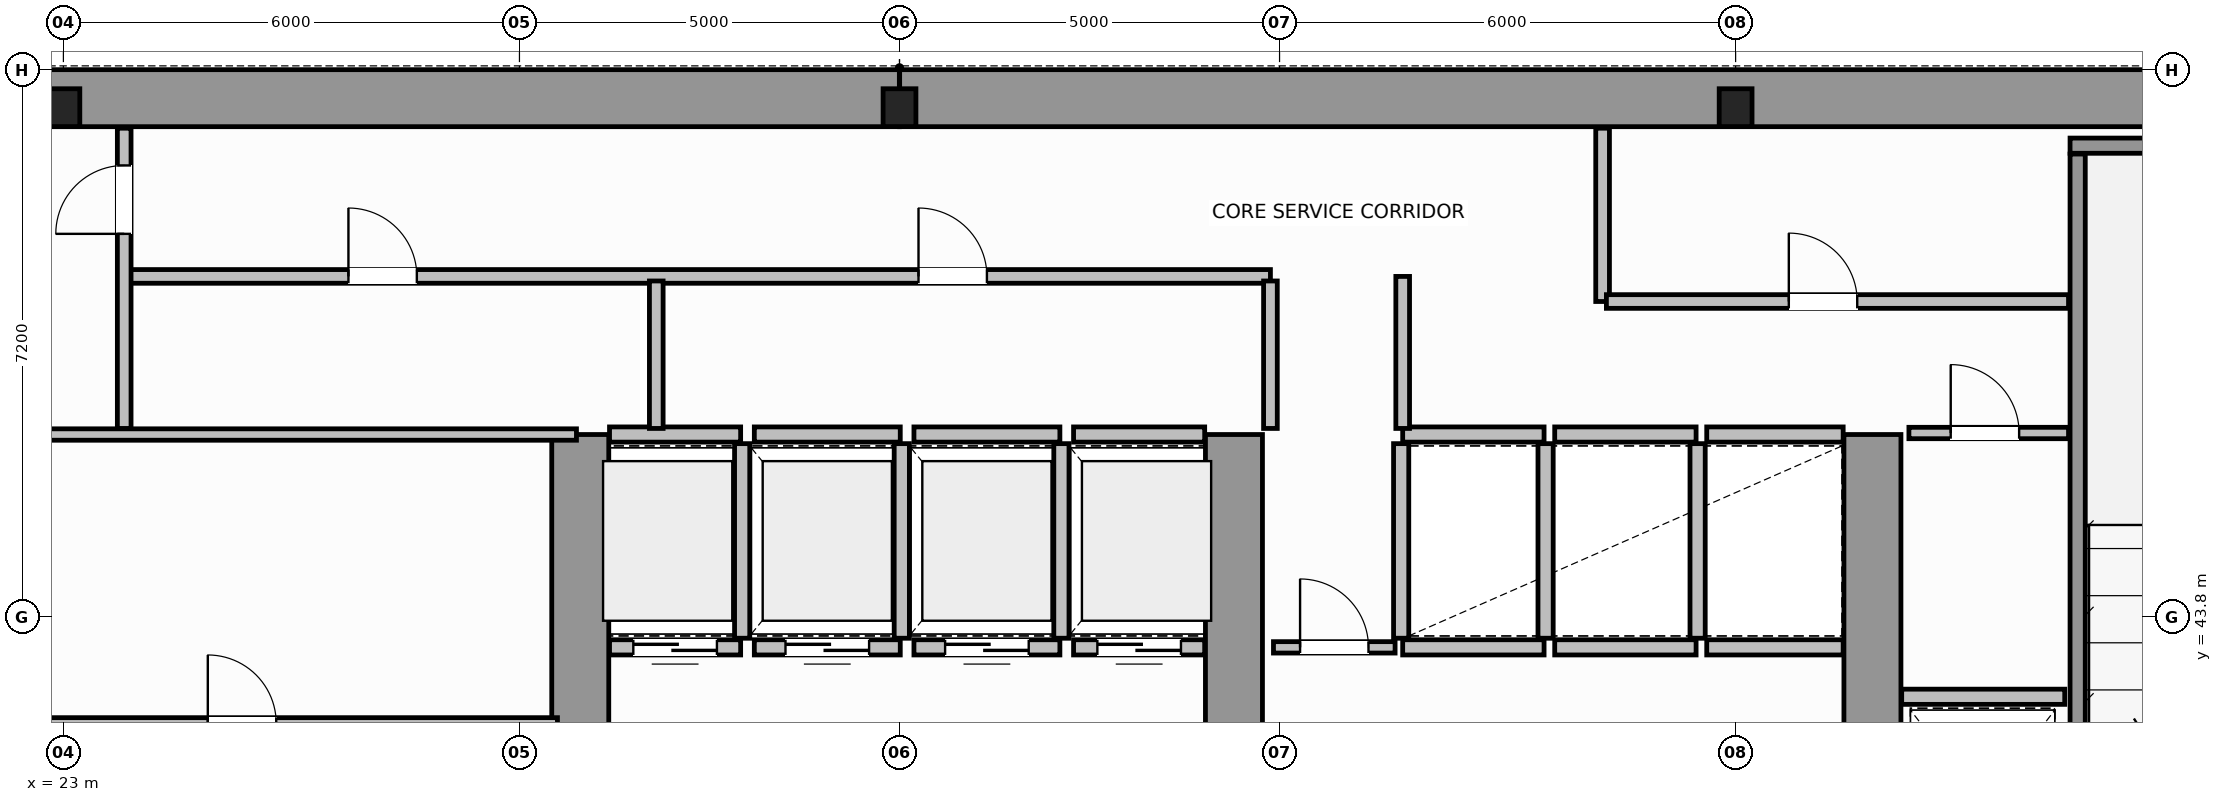
"""IFC4 building model, lengths in metres.
Left out: names, types, materials, properties, quantities, classifications, styles, units other than length and angle.
Written with IfcOpenShell. Run it as: python <this file> out.ifc"""

import sys

from ifc_helpers import new_model, si_unit, direction, frame, frame_2d, origin, origin_2d, place, context, subcontext, project, spatial, rectangle, i_section, extrude, source, transform, mapped, element, fill, save


model = new_model("IFC4")
c1 = context("Model", 3, precision=1e-05, world=origin(), true_north=direction((0.0, 1.0)))
c2 = subcontext(c1, "Body", "Model", "MODEL_VIEW")
j1 = project(units=[si_unit("LENGTHUNIT", "METRE"), si_unit("PLANEANGLEUNIT", "RADIAN")], contexts=[c1])
p1 = place(None, origin())
s1 = spatial("IfcSite", under=j1, at=p1, CompositionType="ELEMENT")
p2 = place(p1, origin())
s2 = spatial("IfcBuilding", under=s1, at=p2, CompositionType="ELEMENT")
p3 = place(p2, frame((0.0, 0.0, 153.8)))
s3 = spatial("IfcBuildingStorey", under=s2, at=p3, CompositionType="ELEMENT", Elevation=153.8)
m1 = source(origin(), c2, "Body", "SweptSolid", [
    extrude(i_section(OverallWidth=0.432, OverallDepth=0.498, WebThickness=0.055, FlangeThickness=0.068, FilletRadius=0.015, at=origin_2d()), origin(), (0.0, 0.0, 1.0), 3.8),
])
for number, where, z_axis, x_axis in (
    (1, (23.0, 50.5, 0.0), (0.0, 0.0, 1.0), (1.0, 0.0, 0.0)),
    (2, (34.0, 50.5, 0.0), (0.0, 0.0, 1.0), (1.0, 0.0, 0.0)),
    (3, (45.0, 50.5, 0.0), (0.0, 0.0, 1.0), (1.0, 0.0, 0.0)),
):
    element("IfcColumn", number, at=place(p3, frame(where, z_axis=z_axis, x_axis=x_axis)), inside=s3, PredefinedType="COLUMN", context=c2, shape_type="MappedRepresentation", body=[
        mapped(m1, transform((0.0, 0.0, 0.0), scale=1.0)),
    ])
for number, where, z_axis, x_axis in (
    (4, (14.379, 50.625, 0.0), (0.0, 0.0, 1.0), (1.0, 0.0, 0.0)),
    (5, (34.002, 50.625, 0.0), (0.0, 0.0, 1.0), (1.0, 0.0, 0.0)),
):
    element("IfcWall", number, at=place(p3, frame(where, z_axis=z_axis, x_axis=x_axis)), inside=s3, PredefinedType="SHEAR", context=c2, shape_type="SweptSolid", body=[
        extrude(rectangle(XDim=19.619, YDim=0.75, at=frame_2d((9.81, 0.0))), origin(), (0.0, 0.0, 1.0), 3.8),
    ])
for number, where, z_axis, x_axis in (
    (6, (29.8, 36.895, 0.0), (0.0, 0.0, 1.0), (0.0, 1.0, 0.0)),
    (7, (38.4, 36.895, 0.0), (0.0, 0.0, 1.0), (0.0, 1.0, 0.0)),
    (8, (46.8, 36.895, 0.0), (0.0, 0.0, 1.0), (0.0, 1.0, 0.0)),
):
    element("IfcWall", number, at=place(p3, frame(where, z_axis=z_axis, x_axis=x_axis)), inside=s3, PredefinedType="SHEAR", context=c2, shape_type="SweptSolid", body=[
        extrude(rectangle(XDim=9.305, YDim=0.75, at=frame_2d((4.652, 0.0))), origin(), (0.0, 0.0, 1.0), 3.8),
    ])
p4 = place(p3, frame((49.4, 50.0, 0.0), z_axis=(0.0, 0.0, 1.0), x_axis=(1.0, 0.0, 0.0)))
e9 = element("IfcWall", 9, at=p4, inside=s3, PredefinedType="SOLIDWALL", context=c2, shape_type="SweptSolid", body=[
    extrude(rectangle(XDim=4.225, YDim=0.2, at=frame_2d((2.113, 0.0))), origin(), (0.0, 0.0, 1.0), 3.8),
])
p5 = place(p3, frame((49.5, 39.96, 0.0), z_axis=(0.0, 0.0, 1.0), x_axis=(0.0, 1.0, 0.0)))
e10 = element("IfcWall", 10, at=p5, inside=s3, PredefinedType="SOLIDWALL", context=c2, shape_type="SweptSolid", body=[
    extrude(rectangle(XDim=9.93, YDim=0.2, at=frame_2d((4.965, 0.0))), origin(), (0.0, 0.0, 1.0), 3.8),
])
p6 = place(p3, frame((30.185, 43.4, 0.0), z_axis=(0.0, 0.0, 1.0), x_axis=(1.0, 0.0, 0.0)))
e11 = element("IfcWall", 11, at=p6, inside=s3, PredefinedType="SOLIDWALL", context=c2, shape_type="SweptSolid", body=[
    extrude(rectangle(XDim=1.725, YDim=0.2, at=frame_2d((0.862, 0.0))), origin(), (0.0, 0.0, 1.0), 3.58),
])
p7 = place(p6, frame((0.313, 0.0, 0.0)))
e12 = element("IfcOpeningElement", 12, at=p7, cuts=e11, PredefinedType="OPENING", context=c2, shape_type="SweptSolid", body=[
    extrude(rectangle(XDim=1.1, YDim=2.15, at=frame_2d((0.55, 1.075))), frame((0.0, 0.11, 0.0), z_axis=(0.0, -1.0, 0.0), x_axis=(1.0, 0.0, 0.0)), (0.0, 0.0, 1.0), 0.22),
])
p8 = place(p3, frame((30.185, 46.2, 0.0), z_axis=(0.0, 0.0, 1.0), x_axis=(1.0, 0.0, 0.0)))
e13 = element("IfcWall", 13, at=p8, inside=s3, PredefinedType="SOLIDWALL", context=c2, shape_type="SweptSolid", body=[
    extrude(rectangle(XDim=1.725, YDim=0.2, at=frame_2d((0.862, 0.0))), origin(), (0.0, 0.0, 1.0), 3.58),
])
p9 = place(p3, frame((31.93, 43.52, 0.0), z_axis=(0.0, 0.0, 1.0), x_axis=(0.0, 1.0, 0.0)))
e14 = element("IfcWall", 14, at=p9, inside=s3, PredefinedType="SOLIDWALL", context=c2, shape_type="SweptSolid", body=[
    extrude(rectangle(XDim=2.56, YDim=0.2, at=frame_2d((1.28, 0.0))), origin(), (0.0, 0.0, 1.0), 3.58),
])
p10 = place(p3, frame((32.09, 43.4, 0.0), z_axis=(0.0, 0.0, 1.0), x_axis=(1.0, 0.0, 0.0)))
e15 = element("IfcWall", 15, at=p10, inside=s3, PredefinedType="SOLIDWALL", context=c2, shape_type="SweptSolid", body=[
    extrude(rectangle(XDim=1.92, YDim=0.2, at=frame_2d((0.96, 0.0))), origin(), (0.0, 0.0, 1.0), 3.58),
])
p11 = place(p10, frame((0.41, 0.0, 0.0)))
e16 = element("IfcOpeningElement", 16, at=p11, cuts=e15, PredefinedType="OPENING", context=c2, shape_type="SweptSolid", body=[
    extrude(rectangle(XDim=1.1, YDim=2.15, at=frame_2d((0.55, 1.075))), frame((0.0, 0.11, 0.0), z_axis=(0.0, -1.0, 0.0), x_axis=(1.0, 0.0, 0.0)), (0.0, 0.0, 1.0), 0.22),
])
p12 = place(p3, frame((32.09, 46.2, 0.0), z_axis=(0.0, 0.0, 1.0), x_axis=(1.0, 0.0, 0.0)))
e17 = element("IfcWall", 17, at=p12, inside=s3, PredefinedType="SOLIDWALL", context=c2, shape_type="SweptSolid", body=[
    extrude(rectangle(XDim=1.92, YDim=0.2, at=frame_2d((0.96, 0.0))), origin(), (0.0, 0.0, 1.0), 3.58),
])
p13 = place(p3, frame((34.03, 43.52, 0.0), z_axis=(0.0, 0.0, 1.0), x_axis=(0.0, 1.0, 0.0)))
e18 = element("IfcWall", 18, at=p13, inside=s3, PredefinedType="SOLIDWALL", context=c2, shape_type="SweptSolid", body=[
    extrude(rectangle(XDim=2.56, YDim=0.2, at=frame_2d((1.28, 0.0))), origin(), (0.0, 0.0, 1.0), 3.58),
])
p14 = place(p3, frame((34.19, 43.4, 0.0), z_axis=(0.0, 0.0, 1.0), x_axis=(1.0, 0.0, 0.0)))
e19 = element("IfcWall", 19, at=p14, inside=s3, PredefinedType="SOLIDWALL", context=c2, shape_type="SweptSolid", body=[
    extrude(rectangle(XDim=1.92, YDim=0.2, at=frame_2d((0.96, 0.0))), origin(), (0.0, 0.0, 1.0), 3.58),
])
p15 = place(p14, frame((0.41, 0.0, 0.0)))
e20 = element("IfcOpeningElement", 20, at=p15, cuts=e19, PredefinedType="OPENING", context=c2, shape_type="SweptSolid", body=[
    extrude(rectangle(XDim=1.1, YDim=2.15, at=frame_2d((0.55, 1.075))), frame((0.0, 0.11, 0.0), z_axis=(0.0, -1.0, 0.0), x_axis=(1.0, 0.0, 0.0)), (0.0, 0.0, 1.0), 0.22),
])
p16 = place(p3, frame((34.19, 46.2, 0.0), z_axis=(0.0, 0.0, 1.0), x_axis=(1.0, 0.0, 0.0)))
e21 = element("IfcWall", 21, at=p16, inside=s3, PredefinedType="SOLIDWALL", context=c2, shape_type="SweptSolid", body=[
    extrude(rectangle(XDim=1.92, YDim=0.2, at=frame_2d((0.96, 0.0))), origin(), (0.0, 0.0, 1.0), 3.58),
])
p17 = place(p3, frame((36.13, 43.52, 0.0), z_axis=(0.0, 0.0, 1.0), x_axis=(0.0, 1.0, 0.0)))
e22 = element("IfcWall", 22, at=p17, inside=s3, PredefinedType="SOLIDWALL", context=c2, shape_type="SweptSolid", body=[
    extrude(rectangle(XDim=2.56, YDim=0.2, at=frame_2d((1.28, 0.0))), origin(), (0.0, 0.0, 1.0), 3.58),
])
p18 = place(p3, frame((36.29, 43.4, 0.0), z_axis=(0.0, 0.0, 1.0), x_axis=(1.0, 0.0, 0.0)))
e23 = element("IfcWall", 23, at=p18, inside=s3, PredefinedType="SOLIDWALL", context=c2, shape_type="SweptSolid", body=[
    extrude(rectangle(XDim=1.725, YDim=0.2, at=frame_2d((0.862, 0.0))), origin(), (0.0, 0.0, 1.0), 3.58),
])
p19 = place(p18, frame((0.313, 0.0, 0.0)))
e24 = element("IfcOpeningElement", 24, at=p19, cuts=e23, PredefinedType="OPENING", context=c2, shape_type="SweptSolid", body=[
    extrude(rectangle(XDim=1.1, YDim=2.15, at=frame_2d((0.55, 1.075))), frame((0.0, 0.11, 0.0), z_axis=(0.0, -1.0, 0.0), x_axis=(1.0, 0.0, 0.0)), (0.0, 0.0, 1.0), 0.22),
])
p20 = place(p3, frame((36.29, 46.2, 0.0), z_axis=(0.0, 0.0, 1.0), x_axis=(1.0, 0.0, 0.0)))
e25 = element("IfcWall", 25, at=p20, inside=s3, PredefinedType="SOLIDWALL", context=c2, shape_type="SweptSolid", body=[
    extrude(rectangle(XDim=1.725, YDim=0.2, at=frame_2d((0.862, 0.0))), origin(), (0.0, 0.0, 1.0), 3.58),
])
for number, where, z_axis, x_axis in (
    (26, (40.62, 43.4, 0.0), (0.0, 0.0, 1.0), (1.0, 0.0, 0.0)),
    (27, (40.62, 46.2, 0.0), (0.0, 0.0, 1.0), (1.0, 0.0, 0.0)),
):
    element("IfcWall", number, at=place(p3, frame(where, z_axis=z_axis, x_axis=x_axis)), inside=s3, PredefinedType="SOLIDWALL", context=c2, shape_type="SweptSolid", body=[
        extrude(rectangle(XDim=1.86, YDim=0.2, at=frame_2d((0.93, 0.0))), origin(), (0.0, 0.0, 1.0), 3.58),
    ])
for number, where, z_axis, x_axis in (
    (28, (40.6, 43.52, 0.0), (0.0, 0.0, 1.0), (0.0, 1.0, 0.0)),
    (29, (42.5, 43.52, 0.0), (0.0, 0.0, 1.0), (0.0, 1.0, 0.0)),
):
    element("IfcWall", number, at=place(p3, frame(where, z_axis=z_axis, x_axis=x_axis)), inside=s3, PredefinedType="SOLIDWALL", context=c2, shape_type="SweptSolid", body=[
        extrude(rectangle(XDim=2.56, YDim=0.2, at=frame_2d((1.28, 0.0))), origin(), (0.0, 0.0, 1.0), 3.58),
    ])
for number, where, z_axis, x_axis in (
    (30, (42.62, 43.4, 0.0), (0.0, 0.0, 1.0), (1.0, 0.0, 0.0)),
    (31, (42.62, 46.2, 0.0), (0.0, 0.0, 1.0), (1.0, 0.0, 0.0)),
):
    element("IfcWall", number, at=place(p3, frame(where, z_axis=z_axis, x_axis=x_axis)), inside=s3, PredefinedType="SOLIDWALL", context=c2, shape_type="SweptSolid", body=[
        extrude(rectangle(XDim=1.86, YDim=0.2, at=frame_2d((0.93, 0.0))), origin(), (0.0, 0.0, 1.0), 3.58),
    ])
p21 = place(p3, frame((44.5, 43.52, 0.0), z_axis=(0.0, 0.0, 1.0), x_axis=(0.0, 1.0, 0.0)))
e32 = element("IfcWall", 32, at=p21, inside=s3, PredefinedType="SOLIDWALL", context=c2, shape_type="SweptSolid", body=[
    extrude(rectangle(XDim=2.56, YDim=0.2, at=frame_2d((1.28, 0.0))), origin(), (0.0, 0.0, 1.0), 3.58),
])
for number, where, z_axis, x_axis in (
    (33, (44.62, 43.4, 0.0), (0.0, 0.0, 1.0), (1.0, 0.0, 0.0)),
    (34, (44.62, 46.2, 0.0), (0.0, 0.0, 1.0), (1.0, 0.0, 0.0)),
):
    element("IfcWall", number, at=place(p3, frame(where, z_axis=z_axis, x_axis=x_axis)), inside=s3, PredefinedType="SOLIDWALL", context=c2, shape_type="SweptSolid", body=[
        extrude(rectangle(XDim=1.795, YDim=0.2, at=frame_2d((0.897, 0.0))), origin(), (0.0, 0.0, 1.0), 3.58),
    ])
p22 = place(p3, frame((47.185, 42.75, 0.0), z_axis=(0.0, 0.0, 1.0), x_axis=(1.0, 0.0, 0.0)))
e35 = element("IfcWall", 35, at=p22, inside=s3, PredefinedType="SOLIDWALL", context=c2, shape_type="SweptSolid", body=[
    extrude(rectangle(XDim=2.145, YDim=0.2, at=frame_2d((1.073, 0.0))), origin(), (0.0, 0.0, 1.0), 3.58),
])
p23 = place(p3, frame((21.25, 46.2, 0.0), z_axis=(0.0, 0.0, 1.0), x_axis=(1.0, 0.0, 0.0)))
e36 = element("IfcWall", 36, at=p23, inside=s3, PredefinedType="PARTITIONING", context=c2, shape_type="SweptSolid", body=[
    extrude(rectangle(XDim=8.5, YDim=0.15, at=frame_2d((4.25, 0.0))), origin(), (0.0, 0.0, 1.0), 3.58),
])
p24 = place(p3, frame((21.5, 42.4, 0.0), z_axis=(0.0, 0.0, 1.0), x_axis=(1.0, 0.0, 0.0)))
e37 = element("IfcWall", 37, at=p24, inside=s3, PredefinedType="PARTITIONING", context=c2, shape_type="SweptSolid", body=[
    extrude(rectangle(XDim=8.0, YDim=0.15, at=frame_2d((4.0, 0.0))), origin(), (0.0, 0.0, 1.0), 3.58),
])
p25 = place(p24, frame((3.4, 0.0, 0.0)))
e38 = element("IfcOpeningElement", 38, at=p25, cuts=e37, PredefinedType="OPENING", context=c2, shape_type="SweptSolid", body=[
    extrude(rectangle(XDim=0.9, YDim=2.1, at=frame_2d((0.45, 1.05))), frame((0.0, 0.085, 0.0), z_axis=(0.0, -1.0, 0.0), x_axis=(1.0, 0.0, 0.0)), (0.0, 0.0, 1.0), 0.17),
])
p26 = place(p3, frame((47.28, 46.22, 0.0), z_axis=(0.0, 0.0, 1.0), x_axis=(1.0, 0.0, 0.0)))
e39 = element("IfcWall", 39, at=p26, inside=s3, PredefinedType="PARTITIONING", context=c2, shape_type="SweptSolid", body=[
    extrude(rectangle(XDim=2.1, YDim=0.15, at=frame_2d((1.05, 0.0))), origin(), (0.0, 0.0, 1.0), 3.58),
])
p27 = place(p26, frame((0.55, 0.0, 0.0)))
e40 = element("IfcOpeningElement", 40, at=p27, cuts=e39, PredefinedType="OPENING", context=c2, shape_type="SweptSolid", body=[
    extrude(rectangle(XDim=0.9, YDim=2.1, at=frame_2d((0.45, 1.05))), frame((0.0, 0.085, 0.0), z_axis=(0.0, -1.0, 0.0), x_axis=(1.0, 0.0, 0.0)), (0.0, 0.0, 1.0), 0.17),
])
p28 = place(p3, frame((38.92, 43.4, 0.0), z_axis=(0.0, 0.0, 1.0), x_axis=(1.0, 0.0, 0.0)))
e41 = element("IfcWall", 41, at=p28, inside=s3, PredefinedType="PARTITIONING", context=c2, shape_type="SweptSolid", body=[
    extrude(rectangle(XDim=1.6, YDim=0.15, at=frame_2d((0.8, 0.0))), origin(), (0.0, 0.0, 1.0), 3.58),
])
p29 = place(p28, frame((0.35, 0.0, 0.0)))
e42 = element("IfcOpeningElement", 42, at=p29, cuts=e41, PredefinedType="OPENING", context=c2, shape_type="SweptSolid", body=[
    extrude(rectangle(XDim=0.9, YDim=2.1, at=frame_2d((0.45, 1.05))), frame((0.0, 0.085, 0.0), z_axis=(0.0, -1.0, 0.0), x_axis=(1.0, 0.0, 0.0)), (0.0, 0.0, 1.0), 0.17),
])
p30 = place(p3, frame((23.85, 48.28, 0.0), z_axis=(0.0, 0.0, 1.0), x_axis=(1.0, 0.0, 0.0)))
e43 = element("IfcWall", 43, at=p30, inside=s3, PredefinedType="PLUMBINGWALL", context=c2, shape_type="SweptSolid", body=[
    extrude(rectangle(XDim=15.03, YDim=0.18, at=frame_2d((7.515, 0.0))), origin(), (0.0, 0.0, 1.0), 3.58),
])
p31 = place(p30, frame((2.9, 0.0, 0.0)))
e44 = element("IfcOpeningElement", 44, at=p31, cuts=e43, PredefinedType="OPENING", context=c2, shape_type="SweptSolid", body=[
    extrude(rectangle(XDim=0.9, YDim=2.15, at=frame_2d((0.45, 1.075))), frame((0.0, 0.1, 0.0), z_axis=(0.0, -1.0, 0.0), x_axis=(1.0, 0.0, 0.0)), (0.0, 0.0, 1.0), 0.2),
])
p32 = place(p30, frame((10.4, 0.0, 0.0)))
e45 = element("IfcOpeningElement", 45, at=p32, cuts=e43, PredefinedType="OPENING", context=c2, shape_type="SweptSolid", body=[
    extrude(rectangle(XDim=0.9, YDim=2.15, at=frame_2d((0.45, 1.075))), frame((0.0, 0.1, 0.0), z_axis=(0.0, -1.0, 0.0), x_axis=(1.0, 0.0, 0.0)), (0.0, 0.0, 1.0), 0.2),
])
p33 = place(p3, frame((23.8, 46.28, 0.0), z_axis=(0.0, 0.0, 1.0), x_axis=(0.0, 1.0, 0.0)))
e46 = element("IfcWall", 46, at=p33, inside=s3, PredefinedType="PLUMBINGWALL", context=c2, shape_type="SweptSolid", body=[
    extrude(rectangle(XDim=3.95, YDim=0.18, at=frame_2d((1.975, 0.0))), origin(), (0.0, 0.0, 1.0), 3.58),
])
p34 = place(p33, frame((2.56, 0.0, 0.0)))
e47 = element("IfcOpeningElement", 47, at=p34, cuts=e46, PredefinedType="OPENING", context=c2, shape_type="SweptSolid", body=[
    extrude(rectangle(XDim=0.9, YDim=2.15, at=frame_2d((0.45, 1.075))), frame((0.0, 0.1, 0.0), z_axis=(0.0, -1.0, 0.0), x_axis=(1.0, 0.0, 0.0)), (0.0, 0.0, 1.0), 0.2),
])
for number, where, z_axis, x_axis in (
    (48, (30.8, 46.28, 0.0), (0.0, 0.0, 1.0), (0.0, 1.0, 0.0)),
    (49, (38.88, 46.28, 0.0), (0.0, 0.0, 1.0), (0.0, 1.0, 0.0)),
):
    element("IfcWall", number, at=place(p3, frame(where, z_axis=z_axis, x_axis=x_axis)), inside=s3, PredefinedType="PLUMBINGWALL", context=c2, shape_type="SweptSolid", body=[
        extrude(rectangle(XDim=1.94, YDim=0.18, at=frame_2d((0.97, 0.0))), origin(), (0.0, 0.0, 1.0), 3.58),
    ])
p35 = place(p3, frame((40.62, 46.28, 0.0), z_axis=(0.0, 0.0, 1.0), x_axis=(0.0, 1.0, 0.0)))
e50 = element("IfcWall", 50, at=p35, inside=s3, PredefinedType="PLUMBINGWALL", context=c2, shape_type="SweptSolid", body=[
    extrude(rectangle(XDim=2.0, YDim=0.18, at=frame_2d((1.0, 0.0))), origin(), (0.0, 0.0, 1.0), 3.58),
])
p36 = place(p3, frame((43.25, 47.95, 0.0), z_axis=(0.0, 0.0, 1.0), x_axis=(0.0, 1.0, 0.0)))
e51 = element("IfcWall", 51, at=p36, inside=s3, PredefinedType="PLUMBINGWALL", context=c2, shape_type="SweptSolid", body=[
    extrude(rectangle(XDim=2.28, YDim=0.18, at=frame_2d((1.14, 0.0))), origin(), (0.0, 0.0, 1.0), 3.58),
])
p37 = place(p3, frame((43.3, 47.95, 0.0), z_axis=(0.0, 0.0, 1.0), x_axis=(1.0, 0.0, 0.0)))
e52 = element("IfcWall", 52, at=p37, inside=s3, PredefinedType="PLUMBINGWALL", context=c2, shape_type="SweptSolid", body=[
    extrude(rectangle(XDim=6.08, YDim=0.18, at=frame_2d((3.04, 0.0))), origin(), (0.0, 0.0, 1.0), 3.58),
])
p38 = place(p37, frame((2.4, 0.0, 0.0)))
e53 = element("IfcOpeningElement", 53, at=p38, cuts=e52, PredefinedType="OPENING", context=c2, shape_type="SweptSolid", body=[
    extrude(rectangle(XDim=0.9, YDim=2.15, at=frame_2d((0.45, 1.075))), frame((0.0, 0.1, 0.0), z_axis=(0.0, -1.0, 0.0), x_axis=(1.0, 0.0, 0.0)), (0.0, 0.0, 1.0), 0.2),
])
m2 = source(origin(), c2, "Body", "SweptSolid", [
    extrude(rectangle(XDim=1.1, YDim=2.15, at=frame_2d((0.55, 1.075))), frame((0.0, 0.025, 0.0), z_axis=(0.0, -1.0, 0.0), x_axis=(1.0, 0.0, 0.0)), (0.0, 0.0, 1.0), 0.05),
])
p39 = place(p7, origin())
e54 = element("IfcDoor", 54, at=p39, inside=s3, OperationType="DOUBLE_DOOR_SLIDING", PredefinedType="DOOR", context=c2, shape_type="MappedRepresentation", body=[
    mapped(m2, transform((0.0, 0.0, 0.0), scale=1.0)),
])
fill(e12, e54)
p40 = place(p11, origin())
e55 = element("IfcDoor", 55, at=p40, inside=s3, OperationType="DOUBLE_DOOR_SLIDING", PredefinedType="DOOR", context=c2, shape_type="MappedRepresentation", body=[
    mapped(m2, transform((0.0, 0.0, 0.0), scale=1.0)),
])
fill(e16, e55)
p41 = place(p15, origin())
e56 = element("IfcDoor", 56, at=p41, inside=s3, OperationType="DOUBLE_DOOR_SLIDING", PredefinedType="DOOR", context=c2, shape_type="MappedRepresentation", body=[
    mapped(m2, transform((0.0, 0.0, 0.0), scale=1.0)),
])
fill(e20, e56)
p42 = place(p19, origin())
e57 = element("IfcDoor", 57, at=p42, inside=s3, OperationType="DOUBLE_DOOR_SLIDING", PredefinedType="DOOR", context=c2, shape_type="MappedRepresentation", body=[
    mapped(m2, transform((0.0, 0.0, 0.0), scale=1.0)),
])
fill(e24, e57)
m3 = source(origin(), c2, "Body", "SweptSolid", [
    extrude(rectangle(XDim=0.9, YDim=2.1, at=frame_2d((0.45, 1.05))), frame((0.0, 0.025, 0.0), z_axis=(0.0, -1.0, 0.0), x_axis=(1.0, 0.0, 0.0)), (0.0, 0.0, 1.0), 0.05),
])
p43 = place(p25, origin())
e58 = element("IfcDoor", 58, at=p43, inside=s3, OperationType="SINGLE_SWING_RIGHT", PredefinedType="DOOR", context=c2, shape_type="MappedRepresentation", body=[
    mapped(m3, transform((0.0, 0.0, 0.0), scale=1.0)),
])
fill(e38, e58)
p44 = place(p27, origin())
e59 = element("IfcDoor", 59, at=p44, inside=s3, OperationType="SINGLE_SWING_RIGHT", PredefinedType="DOOR", context=c2, shape_type="MappedRepresentation", body=[
    mapped(m3, transform((0.0, 0.0, 0.0), scale=1.0)),
])
fill(e40, e59)
p45 = place(p29, origin())
e60 = element("IfcDoor", 60, at=p45, inside=s3, OperationType="SINGLE_SWING_LEFT", PredefinedType="DOOR", context=c2, shape_type="MappedRepresentation", body=[
    mapped(m3, transform((0.0, 0.0, 0.0), scale=1.0)),
])
fill(e42, e60)
m4 = source(origin(), c2, "Body", "SweptSolid", [
    extrude(rectangle(XDim=0.9, YDim=2.15, at=frame_2d((0.45, 1.075))), frame((0.0, 0.025, 0.0), z_axis=(0.0, -1.0, 0.0), x_axis=(1.0, 0.0, 0.0)), (0.0, 0.0, 1.0), 0.05),
])
p46 = place(p34, origin())
e61 = element("IfcDoor", 61, at=p46, inside=s3, OperationType="SINGLE_SWING_LEFT", PredefinedType="DOOR", context=c2, shape_type="MappedRepresentation", body=[
    mapped(m4, transform((0.0, 0.0, 0.0), scale=1.0)),
])
fill(e47, e61)
p47 = place(p31, origin())
e62 = element("IfcDoor", 62, at=p47, inside=s3, OperationType="SINGLE_SWING_RIGHT", PredefinedType="DOOR", context=c2, shape_type="MappedRepresentation", body=[
    mapped(m4, transform((0.0, 0.0, 0.0), scale=1.0)),
])
fill(e44, e62)
p48 = place(p32, origin())
e63 = element("IfcDoor", 63, at=p48, inside=s3, OperationType="SINGLE_SWING_LEFT", PredefinedType="DOOR", context=c2, shape_type="MappedRepresentation", body=[
    mapped(m4, transform((0.0, 0.0, 0.0), scale=1.0)),
])
fill(e45, e63)
p49 = place(p38, origin())
e64 = element("IfcDoor", 64, at=p49, inside=s3, OperationType="SINGLE_SWING_RIGHT", PredefinedType="DOOR", context=c2, shape_type="MappedRepresentation", body=[
    mapped(m4, transform((0.0, 0.0, 0.0), scale=1.0)),
])
fill(e53, e64)
save(model, sys.argv[1])
